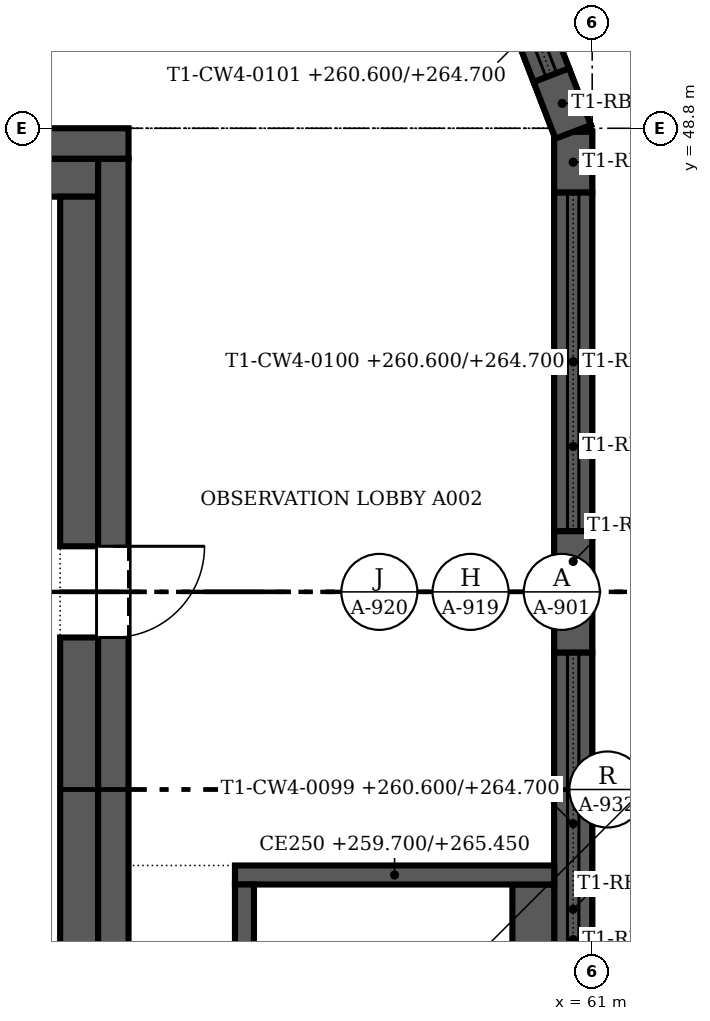
"""IFC4 building model, lengths in metres.
Left out: names, types, materials, properties, quantities, classifications, styles, units other than length and angle.
Written with IfcOpenShell. Run it as: python <this file> out.ifc"""

import sys

from ifc_helpers import new_model, si_unit, direction, frame, frame_2d, origin, place, context, subcontext, project, spatial, polyline, rectangle, outline, extrude, faceted_brep, source, transform, mapped, element, fill, save


model = new_model("IFC4")
c1 = context("Model", 3, precision=1e-05, world=origin(), true_north=direction((0.0, 1.0)))
c2 = subcontext(c1, "Body", "Model", "MODEL_VIEW")
j1 = project(units=[si_unit("LENGTHUNIT", "METRE"), si_unit("PLANEANGLEUNIT", "RADIAN")], contexts=[c1])
p1 = place(None, origin())
s1 = spatial("IfcSite", under=j1, at=p1, CompositionType="ELEMENT")
p2 = place(p1, origin())
s2 = spatial("IfcBuilding", under=s1, at=p2, CompositionType="ELEMENT")
p3 = place(p2, frame((0.0, 0.0, 259.7)))
s3 = spatial("IfcBuildingStorey", under=s2, at=p3, CompositionType="ELEMENT", Elevation=259.7)
m1 = source(origin(), c2, "Body", "SweptSolid", [
    extrude(outline(polyline([(0.0, 0.0), (1.6, 0.0), (1.6, 5.0), (0.0, 5.0), (0.0, 0.0)])), frame((0.0, 0.25, 0.0), z_axis=(0.0, -1.0, 0.0), x_axis=(1.0, 0.0, 0.0)), (0.0, 0.0, 1.0), 0.5),
])
p4 = place(p3, frame((60.75, 41.9, 0.0), z_axis=(0.0, 0.0, 1.0), x_axis=(0.0, 1.0, 0.0)))
e1 = element("IfcWall", 1, at=p4, inside=s3, PredefinedType="SOLIDWALL", context=c2, shape_type="MappedRepresentation", body=[
    mapped(m1, transform((0.0, 0.0, 0.0), scale=1.0)),
])
m2 = source(origin(), c2, "Body", "Brep", [
    faceted_brep([(0.0, -0.25, 0.0), (0.8, -0.25, 0.0), (0.8, -0.25, 5.0), (0.0, -0.25, 5.0), (0.0, 0.25, 5.0), (0.753, 0.25, 5.0), (0.753, 0.25, 0.0), (0.0, 0.25, 0.0), (0.8, -0.0, 0.0), (0.8, -0.0, 5.0)], [[[0, 1, 2, 3]], [[4, 5, 6, 7]], [[7, 6, 8, 1, 0]], [[9, 2, 1, 8]], [[5, 4, 3, 2, 9]], [[4, 7, 0, 3]], [[8, 6, 5, 9]]]),
])
p5 = place(p3, frame((60.75, 47.953, 0.0), z_axis=(0.0, 0.0, 1.0), x_axis=(0.0, 1.0, 0.0)))
e2 = element("IfcWall", 2, at=p5, inside=s3, PredefinedType="SOLIDWALL", context=c2, shape_type="MappedRepresentation", body=[
    mapped(m2, transform((0.0, 0.0, 0.0), scale=1.0)),
])
m3 = source(origin(), c2, "Body", "SweptSolid", [
    extrude(outline(polyline([(0.0, 0.0), (4.5, 0.0), (4.5, 0.9), (0.0, 0.9), (0.0, 0.0)])), frame((0.0, 0.25, 0.0), z_axis=(0.0, -1.0, 0.0), x_axis=(1.0, 0.0, 0.0)), (0.0, 0.0, 1.0), 0.5),
])
p6 = place(p3, frame((60.75, 37.4, 0.0), z_axis=(0.0, 0.0, 1.0), x_axis=(0.0, 1.0, 0.0)))
e3 = element("IfcWall", 3, at=p6, inside=s3, PredefinedType="SOLIDWALL", context=c2, shape_type="MappedRepresentation", body=[
    mapped(m3, transform((0.0, 0.0, 0.0), scale=1.0)),
])
m4 = source(origin(), c2, "Body", "Brep", [
    faceted_brep([(0.0, -0.25, 0.0), (6.1, -0.25, 0.0), (6.1, -0.25, 1.0), (0.0, -0.25, 1.0), (0.0, 0.25, 1.0), (6.1, 0.25, 1.0), (6.1, 0.25, 0.0), (0.0, 0.25, 0.0)], [[[0, 1, 2, 3]], [[4, 5, 6, 7]], [[7, 6, 1, 0]], [[5, 4, 3, 2]], [[4, 7, 0, 3]], [[1, 6, 5, 2]]]),
])
p7 = place(p3, frame((60.75, 36.6, 5.0), z_axis=(0.0, 0.0, 1.0), x_axis=(0.0, 1.0, 0.0)))
e4 = element("IfcWall", 4, at=p7, inside=s3, PredefinedType="SOLIDWALL", context=c2, shape_type="MappedRepresentation", body=[
    mapped(m4, transform((0.0, 0.0, 0.0), scale=1.0)),
])
m5 = source(origin(), c2, "Body", "SweptSolid", [
    extrude(outline(polyline([(0.0, 0.0), (4.453, 0.0), (4.453, 0.9), (0.0, 0.9), (0.0, 0.0)])), frame((0.0, 0.25, 0.0), z_axis=(0.0, -1.0, 0.0), x_axis=(1.0, 0.0, 0.0)), (0.0, 0.0, 1.0), 0.5),
])
p8 = place(p3, frame((60.75, 43.5, 0.0), z_axis=(0.0, 0.0, 1.0), x_axis=(0.0, 1.0, 0.0)))
e5 = element("IfcWall", 5, at=p8, inside=s3, PredefinedType="SOLIDWALL", context=c2, shape_type="MappedRepresentation", body=[
    mapped(m5, transform((0.0, 0.0, 0.0), scale=1.0)),
])
m6 = source(origin(), c2, "Body", "Brep", [
    faceted_brep([(0.0, -0.25, 0.0), (6.053, -0.25, 0.0), (6.053, -0.25, 1.0), (0.0, -0.25, 1.0), (0.0, 0.25, 1.0), (6.007, 0.25, 1.0), (6.007, 0.25, 0.0), (0.0, 0.25, 0.0), (6.053, 0.0, 0.0), (6.053, 0.0, 1.0)], [[[0, 1, 2, 3]], [[4, 5, 6, 7]], [[7, 6, 8, 1, 0]], [[9, 2, 1, 8]], [[5, 4, 3, 2, 9]], [[4, 7, 0, 3]], [[8, 6, 5, 9]]]),
])
p9 = place(p3, frame((60.75, 42.7, 5.0), z_axis=(0.0, 0.0, 1.0), x_axis=(0.0, 1.0, 0.0)))
e6 = element("IfcWall", 6, at=p9, inside=s3, PredefinedType="SOLIDWALL", context=c2, shape_type="MappedRepresentation", body=[
    mapped(m6, transform((0.0, 0.0, 0.0), scale=1.0)),
])
m7 = source(origin(), c2, "Body", "Brep", [
    faceted_brep([(0.0, -0.25, 0.0), (0.8, -0.25, 0.0), (0.8, -0.25, 5.0), (0.0, -0.25, 5.0), (0.047, 0.25, 5.0), (0.8, 0.25, 5.0), (0.8, 0.25, 0.0), (0.047, 0.25, 0.0), (0.0, 0.0, 0.0), (0.0, 0.0, 5.0)], [[[0, 1, 2, 3]], [[4, 5, 6, 7]], [[7, 6, 1, 0, 8]], [[5, 4, 9, 3, 2]], [[8, 0, 3, 9]], [[7, 8, 9, 4]], [[1, 6, 5, 2]]]),
])
p10 = place(p3, frame((60.75, 48.753, 0.0), z_axis=(0.0, 0.0, 1.0), x_axis=(-0.359735468129, 0.933054335486, 0.0)))
e7 = element("IfcWall", 7, at=p10, inside=s3, PredefinedType="SOLIDWALL", context=c2, shape_type="MappedRepresentation", body=[
    mapped(m7, transform((0.0, 0.0, 0.0), scale=1.0)),
])
m8 = source(origin(), c2, "Body", "SweptSolid", [
    extrude(outline(polyline([(0.0, 0.0), (1.351, 0.0), (1.351, 0.9), (0.0, 0.9), (0.0, 0.0)])), frame((0.0, 0.25, 0.0), z_axis=(0.0, -1.0, 0.0), x_axis=(1.0, 0.0, 0.0)), (0.0, 0.0, 1.0), 0.5),
])
p11 = place(p3, frame((60.462, 49.5, 0.0), z_axis=(0.0, 0.0, 1.0), x_axis=(-0.359923772835, 0.932981713512, 0.0)))
e8 = element("IfcWall", 8, at=p11, inside=s3, PredefinedType="SOLIDWALL", context=c2, shape_type="MappedRepresentation", body=[
    mapped(m8, transform((0.0, 0.0, 0.0), scale=1.0)),
])
m9 = source(origin(), c2, "Body", "Brep", [
    faceted_brep([(0.0, -0.25, 0.0), (2.95, -0.25, 0.0), (2.95, -0.25, 1.0), (0.0, -0.25, 1.0), (0.047, 0.25, 1.0), (2.898, 0.25, 1.0), (2.898, 0.25, 0.0), (0.047, 0.25, 0.0), (2.95, 0.0, 0.0), (0.0, 0.0, 0.0), (2.95, 0.0, 1.0), (0.0, 0.0, 1.0)], [[[0, 1, 2, 3]], [[4, 5, 6, 7]], [[7, 6, 8, 1, 0, 9]], [[10, 2, 1, 8]], [[5, 4, 11, 3, 2, 10]], [[9, 0, 3, 11]], [[7, 9, 11, 4]], [[8, 6, 5, 10]]]),
])
p12 = place(p3, frame((60.75, 48.753, 5.0), z_axis=(0.0, 0.0, 1.0), x_axis=(-0.359877213415, 0.932999673775, 0.0)))
e9 = element("IfcWall", 9, at=p12, inside=s3, PredefinedType="SOLIDWALL", context=c2, shape_type="MappedRepresentation", body=[
    mapped(m9, transform((0.0, 0.0, 0.0), scale=1.0)),
])
p13 = place(p3, frame((30.5, 48.6, 0.0), z_axis=(0.0, 0.0, 1.0), x_axis=(1.0, 0.0, 0.0)))
e10 = element("IfcWall", 10, at=p13, inside=s3, PredefinedType="SHEAR", context=c2, shape_type="SweptSolid", body=[
    extrude(rectangle(XDim=24.4, YDim=0.4, at=frame_2d((12.2, 0.0))), origin(), (0.0, 0.0, 1.0), 6.0),
])
p14 = place(p3, frame((54.7, 48.4, 0.0), z_axis=(0.0, 0.0, 1.0), x_axis=(0.0, -1.0, 0.0)))
e11 = element("IfcWall", 11, at=p14, inside=s3, PredefinedType="SHEAR", context=c2, shape_type="SweptSolid", body=[
    extrude(rectangle(XDim=23.6, YDim=0.4, at=frame_2d((11.8, 0.0))), origin(), (0.0, 0.0, 1.0), 6.0),
])
m10 = source(origin(), c2, "Body", "SweptSolid", [
    extrude(rectangle(XDim=1.2, YDim=2.1, at=frame_2d((0.6, 1.05))), frame((0.0, 0.21, 0.0), z_axis=(0.0, -1.0, 0.0), x_axis=(1.0, 0.0, 0.0)), (0.0, 0.0, 1.0), 0.42),
])
p15 = place(p14, frame((5.1, 0.0, 0.0)))
e12 = element("IfcOpeningElement", 12, at=p15, cuts=e11, PredefinedType="OPENING", context=c2, shape_type="MappedRepresentation", body=[
    mapped(m10, transform((0.0, 0.0, 0.0), scale=1.0)),
])
p16 = place(p3, frame((30.9, 48.15, 0.0), z_axis=(0.0, 0.0, 1.0), x_axis=(1.0, 0.0, 0.0)))
e13 = element("IfcWall", 13, at=p16, inside=s3, PredefinedType="SOLIDWALL", context=c2, shape_type="SweptSolid", body=[
    extrude(rectangle(XDim=23.6, YDim=0.5, at=frame_2d((11.8, 0.0))), origin(), (0.0, 0.0, 1.0), 6.0),
])
p17 = place(p3, frame((54.25, 36.88, 0.0), z_axis=(0.0, 0.0, 1.0), x_axis=(0.0, 1.0, 0.0)))
e14 = element("IfcWall", 14, at=p17, inside=s3, PredefinedType="SOLIDWALL", context=c2, shape_type="SweptSolid", body=[
    extrude(rectangle(XDim=5.22, YDim=0.5, at=frame_2d((2.61, 0.0))), origin(), (0.0, 0.0, 1.0), 6.0),
])
p18 = place(p3, frame((54.25, 43.3, 0.0), z_axis=(0.0, 0.0, 1.0), x_axis=(0.0, 1.0, 0.0)))
e15 = element("IfcWall", 15, at=p18, inside=s3, PredefinedType="SOLIDWALL", context=c2, shape_type="SweptSolid", body=[
    extrude(rectangle(XDim=4.6, YDim=0.5, at=frame_2d((2.3, 0.0))), origin(), (0.0, 0.0, 1.0), 6.0),
])
p19 = place(p3, frame((56.425, 30.85, 0.0), z_axis=(0.0, 0.0, 1.0), x_axis=(0.0, 1.0, 0.0)))
e16 = element("IfcWall", 16, at=p19, inside=s3, PredefinedType="SOLIDWALL", context=c2, shape_type="SweptSolid", body=[
    extrude(rectangle(XDim=8.0, YDim=0.25, at=frame_2d((4.0, 0.0))), origin(), (0.0, 0.0, 1.0), 5.75),
])
p20 = place(p3, frame((56.3, 38.975, 0.0), z_axis=(0.0, 0.0, 1.0), x_axis=(1.0, 0.0, 0.0)))
e17 = element("IfcWall", 17, at=p20, inside=s3, PredefinedType="SOLIDWALL", context=c2, shape_type="SweptSolid", body=[
    extrude(rectangle(XDim=4.2, YDim=0.25, at=frame_2d((2.1, 0.0))), origin(), (0.0, 0.0, 1.0), 5.75),
])
p21 = place(p3, frame((60.225, 38.85, 0.0), z_axis=(0.0, 0.0, 1.0), x_axis=(0.0, -1.0, 0.0)))
e18 = element("IfcWall", 18, at=p21, inside=s3, PredefinedType="SOLIDWALL", context=c2, shape_type="SweptSolid", body=[
    extrude(rectangle(XDim=8.0, YDim=0.55, at=frame_2d((4.0, 0.0))), origin(), (0.0, 0.0, 1.0), 5.75),
])
m11 = source(origin(), c2, "Body", "SweptSolid", [
    extrude(rectangle(XDim=1.2, YDim=2.1, at=frame_2d((0.6, 1.05))), frame((0.0, 0.025, 0.0), z_axis=(0.0, -1.0, 0.0), x_axis=(1.0, 0.0, 0.0)), (0.0, 0.0, 1.0), 0.05),
])
p22 = place(p15, origin())
e19 = element("IfcDoor", 19, at=p22, inside=s3, OperationType="SINGLE_SWING_LEFT", PredefinedType="DOOR", context=c2, shape_type="MappedRepresentation", body=[
    mapped(m11, transform((0.0, 0.0, 0.0), scale=1.0)),
])
fill(e12, e19)
save(model, sys.argv[1])
